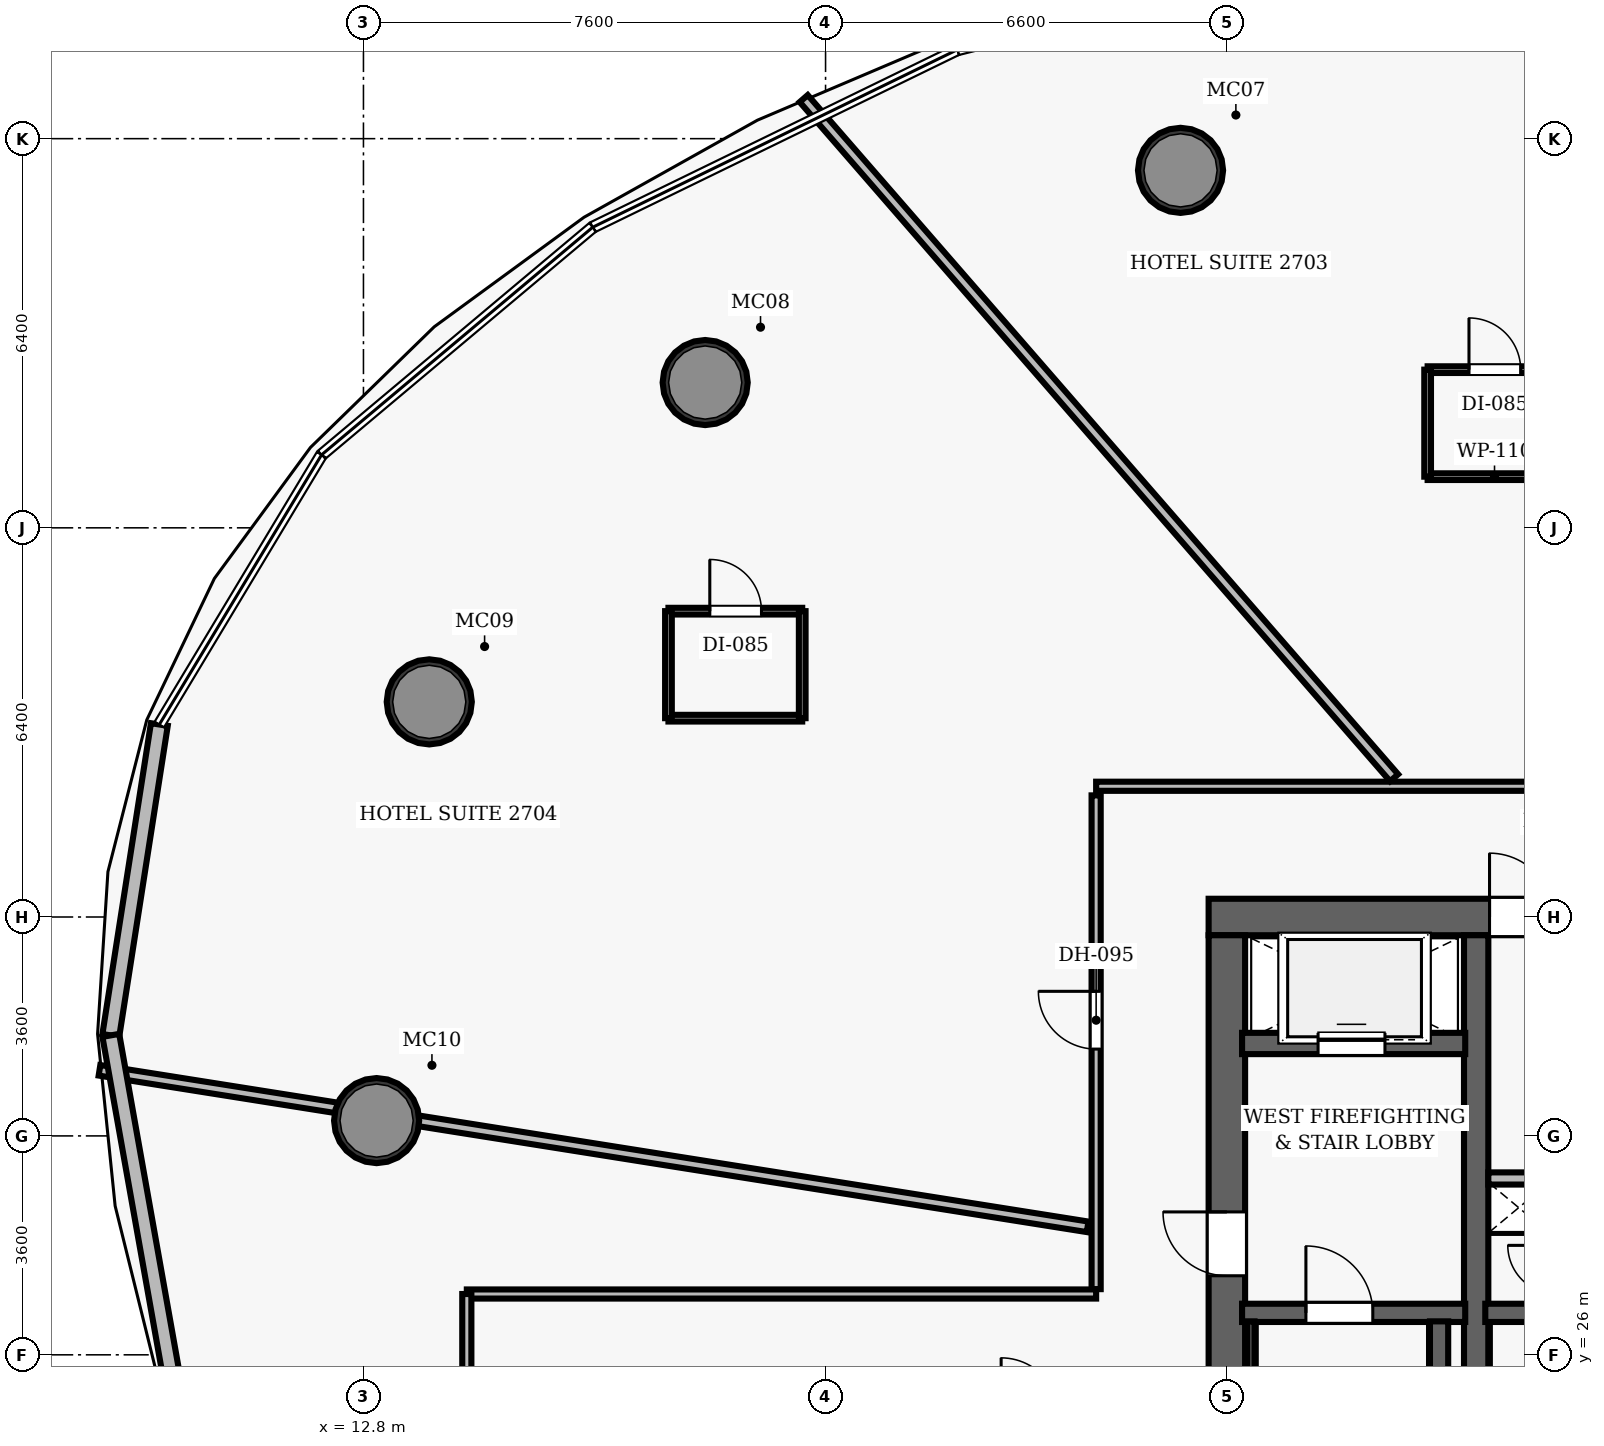
"""IFC4 building model, lengths in metres.
Left out: names, types, materials, properties, quantities, classifications, styles, units other than length and angle.
Written with IfcOpenShell. Run it as: python <this file> out.ifc"""

import sys

from ifc_helpers import new_model, si_unit, direction, frame, frame_2d, origin, origin_2d, place, context, subcontext, project, spatial, rectangle, hollow_circle, extrude, element, fill, save


model = new_model("IFC4")
c1 = context("Model", 3, precision=1e-05, world=origin(), true_north=direction((0.0, 1.0)))
c2 = subcontext(c1, "Body", "Model", "MODEL_VIEW")
j1 = project(units=[si_unit("LENGTHUNIT", "METRE"), si_unit("PLANEANGLEUNIT", "RADIAN")], contexts=[c1])
p1 = place(None, origin())
s1 = spatial("IfcSite", under=j1, at=p1, CompositionType="ELEMENT")
p2 = place(p1, origin())
s2 = spatial("IfcBuilding", under=s1, at=p2, CompositionType="ELEMENT")
p3 = place(p2, frame((0.0, 0.0, 113.3)))
s3 = spatial("IfcBuildingStorey", under=s2, at=p3, CompositionType="ELEMENT", Elevation=113.3)
p4 = place(p3, frame((26.7, 33.2, 0.0), z_axis=(0.0, 0.0, 1.0), x_axis=(1.0, 0.0, 0.0)))
e1 = element("IfcWall", 1, at=p4, inside=s3, PredefinedType="SHEAR", context=c2, shape_type="SweptSolid", body=[
    extrude(rectangle(XDim=22.6, YDim=0.6, at=frame_2d((11.3, 0.0))), origin(), (0.0, 0.0, 1.0), 3.5),
])
p5 = place(p4, frame((4.62, 0.0, 0.0)))
e2 = element("IfcOpeningElement", 2, at=p5, cuts=e1, PredefinedType="OPENING", context=c2, shape_type="SweptSolid", body=[
    extrude(rectangle(XDim=1.05, YDim=2.15, at=frame_2d((0.525, 1.075))), frame((0.0, 0.31, 0.0), z_axis=(0.0, -1.0, 0.0), x_axis=(1.0, 0.0, 0.0)), (0.0, 0.0, 1.0), 0.62),
])
p6 = place(p4, frame((14.52, 0.0, 0.0)))
e3 = element("IfcOpeningElement", 3, at=p6, cuts=e1, PredefinedType="OPENING", context=c2, shape_type="SweptSolid", body=[
    extrude(rectangle(XDim=1.05, YDim=2.15, at=frame_2d((0.525, 1.075))), frame((0.0, 0.31, 0.0), z_axis=(0.0, -1.0, 0.0), x_axis=(1.0, 0.0, 0.0)), (0.0, 0.0, 1.0), 0.62),
])
p7 = place(p3, frame((27.0, 19.1, 0.0), z_axis=(0.0, 0.0, 1.0), x_axis=(0.0, 1.0, 0.0)))
e4 = element("IfcWall", 4, at=p7, inside=s3, PredefinedType="SHEAR", context=c2, shape_type="SweptSolid", body=[
    extrude(rectangle(XDim=13.8, YDim=0.6, at=frame_2d((6.9, 0.0))), origin(), (0.0, 0.0, 1.0), 3.5),
])
p8 = place(p7, frame((8.2, 0.0, 0.0)))
e5 = element("IfcOpeningElement", 5, at=p8, cuts=e4, PredefinedType="OPENING", context=c2, shape_type="SweptSolid", body=[
    extrude(rectangle(XDim=1.05, YDim=2.15, at=frame_2d((0.525, 1.075))), frame((0.0, 0.31, 0.0), z_axis=(0.0, -1.0, 0.0), x_axis=(1.0, 0.0, 0.0)), (0.0, 0.0, 1.0), 0.62),
])
p9 = place(p3, frame((31.1, 19.1, 0.0), z_axis=(0.0, 0.0, 1.0), x_axis=(0.0, 1.0, 0.0)))
e6 = element("IfcWall", 6, at=p9, inside=s3, PredefinedType="SHEAR", context=c2, shape_type="SweptSolid", body=[
    extrude(rectangle(XDim=13.8, YDim=0.4, at=frame_2d((6.9, 0.0))), origin(), (0.0, 0.0, 1.0), 3.5),
])
for number, where, z_axis, x_axis in (
    (7, (26.238, 45.479, 0.0), (0.0, 0.0, 1.0), (1.0, 0.0, 0.0)),
    (8, (18.42, 41.989, 0.0), (0.0, 0.0, 1.0), (1.0, 0.0, 0.0)),
    (9, (13.882, 36.738, 0.0), (0.0, 0.0, 1.0), (1.0, 0.0, 0.0)),
    (10, (13.016, 29.852, 0.0), (0.0, 0.0, 1.0), (1.0, 0.0, 0.0)),
):
    element("IfcColumn", number, at=place(p3, frame(where, z_axis=z_axis, x_axis=x_axis)), inside=s3, PredefinedType="COLUMN", context=c2, shape_type="SweptSolid", body=[
        extrude(hollow_circle(Radius=0.7, WallThickness=0.055, at=origin_2d()), origin(), (0.0, 0.0, 1.0), 3.5),
    ])
p10 = place(p3, frame((27.25, 26.69, 0.0), z_axis=(0.0, 0.0, 1.0), x_axis=(1.0, 0.0, 0.0)))
e11 = element("IfcWall", 11, at=p10, inside=s3, PredefinedType="SHEAR", context=c2, shape_type="SweptSolid", body=[
    extrude(rectangle(XDim=3.67, YDim=0.3, at=frame_2d((1.835, 0.0))), origin(), (0.0, 0.0, 1.0), 3.5),
])
p11 = place(p10, frame((1.05, 0.0, 0.0)))
e12 = element("IfcOpeningElement", 12, at=p11, cuts=e11, PredefinedType="OPENING", context=c2, shape_type="SweptSolid", body=[
    extrude(rectangle(XDim=1.1, YDim=2.15, at=frame_2d((0.55, 1.075))), frame((0.0, 0.16, 0.0), z_axis=(0.0, -1.0, 0.0), x_axis=(1.0, 0.0, 0.0)), (0.0, 0.0, 1.0), 0.32),
])
p12 = place(p3, frame((30.49, 19.05, 0.0), z_axis=(0.0, 0.0, 1.0), x_axis=(0.0, 1.0, 0.0)))
e13 = element("IfcWall", 13, at=p12, inside=s3, PredefinedType="SHEAR", context=c2, shape_type="SweptSolid", body=[
    extrude(rectangle(XDim=7.5, YDim=0.3, at=frame_2d((3.75, 0.0))), origin(), (0.0, 0.0, 1.0), 3.5),
])
p13 = place(p3, frame((27.395, 19.1, 0.0), z_axis=(0.0, 0.0, 1.0), x_axis=(0.0, 1.0, 0.0)))
e14 = element("IfcWall", 14, at=p13, inside=s3, PredefinedType="SHEAR", context=c2, shape_type="SweptSolid", body=[
    extrude(rectangle(XDim=7.45, YDim=0.12, at=frame_2d((3.725, 0.0))), origin(), (0.0, 0.0, 1.0), 3.5),
])
p14 = place(p3, frame((27.25, 31.12, 0.0), z_axis=(0.0, 0.0, 1.0), x_axis=(1.0, 0.0, 0.0)))
e15 = element("IfcWall", 15, at=p14, inside=s3, PredefinedType="SHEAR", context=c2, shape_type="SweptSolid", body=[
    extrude(rectangle(XDim=3.67, YDim=0.35, at=frame_2d((1.835, 0.0))), origin(), (0.0, 0.0, 1.0), 2.675),
])
p15 = place(p14, frame((1.25, 0.0, 0.0)))
e16 = element("IfcOpeningElement", 16, at=p15, cuts=e15, PredefinedType="OPENING", context=c2, shape_type="SweptSolid", body=[
    extrude(rectangle(XDim=1.1, YDim=2.15, at=frame_2d((0.55, 1.075))), frame((0.0, 0.185, 0.0), z_axis=(0.0, -1.0, 0.0), x_axis=(1.0, 0.0, 0.0)), (0.0, 0.0, 1.0), 0.37),
])
p16 = place(p3, frame((31.25, 26.69, 0.0), z_axis=(0.0, 0.0, 1.0), x_axis=(1.0, 0.0, 0.0)))
e17 = element("IfcWall", 17, at=p16, inside=s3, PredefinedType="SHEAR", context=c2, shape_type="SweptSolid", body=[
    extrude(rectangle(XDim=3.56, YDim=0.3, at=frame_2d((1.78, 0.0))), origin(), (0.0, 0.0, 1.0), 3.5),
])
p17 = place(p16, frame((1.55, 0.0, 0.0)))
e18 = element("IfcOpeningElement", 18, at=p17, cuts=e17, PredefinedType="OPENING", context=c2, shape_type="SweptSolid", body=[
    extrude(rectangle(XDim=1.1, YDim=2.15, at=frame_2d((0.55, 1.075))), frame((0.0, 0.16, 0.0), z_axis=(0.0, -1.0, 0.0), x_axis=(1.0, 0.0, 0.0)), (0.0, 0.0, 1.0), 0.32),
])
p18 = place(p3, frame((31.3, 28.9, 0.0), z_axis=(0.0, 0.0, 1.0), x_axis=(1.0, 0.0, 0.0)))
e19 = element("IfcWall", 19, at=p18, inside=s3, PredefinedType="PARTITIONING", context=c2, shape_type="SweptSolid", body=[
    extrude(rectangle(XDim=1.12, YDim=0.2, at=frame_2d((0.56, 0.0))), origin(), (0.0, 0.0, 1.0), 2.675),
])
p19 = place(p3, frame((24.85, 35.35, 0.0), z_axis=(0.0, 0.0, 1.0), x_axis=(1.0, 0.0, 0.0)))
e20 = element("IfcWall", 20, at=p19, inside=s3, PredefinedType="PARTITIONING", context=c2, shape_type="SweptSolid", body=[
    extrude(rectangle(XDim=26.0, YDim=0.15, at=frame_2d((13.0, 0.0))), origin(), (0.0, 0.0, 1.0), 2.675),
])
p20 = place(p19, frame((14.325, 0.0, 0.0)))
e21 = element("IfcOpeningElement", 21, at=p20, cuts=e20, PredefinedType="OPENING", context=c2, shape_type="SweptSolid", body=[
    extrude(rectangle(XDim=0.95, YDim=2.15, at=frame_2d((0.475, 1.075))), frame((0.0, 0.085, 0.0), z_axis=(0.0, -1.0, 0.0), x_axis=(1.0, 0.0, 0.0)), (0.0, 0.0, 1.0), 0.17),
])
p21 = place(p19, frame((7.162, 0.0, 0.0)))
e22 = element("IfcOpeningElement", 22, at=p21, cuts=e20, PredefinedType="OPENING", context=c2, shape_type="SweptSolid", body=[
    extrude(rectangle(XDim=0.95, YDim=2.15, at=frame_2d((0.475, 1.075))), frame((0.0, 0.085, 0.0), z_axis=(0.0, -1.0, 0.0), x_axis=(1.0, 0.0, 0.0)), (0.0, 0.0, 1.0), 0.17),
])
p22 = place(p3, frame((24.85, 27.08, 0.0), z_axis=(0.0, 0.0, 1.0), x_axis=(0.0, 1.0, 0.0)))
e23 = element("IfcWall", 23, at=p22, inside=s3, PredefinedType="PARTITIONING", context=c2, shape_type="SweptSolid", body=[
    extrude(rectangle(XDim=8.12, YDim=0.15, at=frame_2d((4.06, 0.0))), origin(), (0.0, 0.0, 1.0), 2.675),
])
p23 = place(p22, frame((3.948, 0.0, 0.0)))
e24 = element("IfcOpeningElement", 24, at=p23, cuts=e23, PredefinedType="OPENING", context=c2, shape_type="SweptSolid", body=[
    extrude(rectangle(XDim=0.95, YDim=2.15, at=frame_2d((0.475, 1.075))), frame((0.0, 0.085, 0.0), z_axis=(0.0, -1.0, 0.0), x_axis=(1.0, 0.0, 0.0)), (0.0, 0.0, 1.0), 0.17),
])
p24 = place(p3, frame((14.5, 27.0, 0.0), z_axis=(0.0, 0.0, 1.0), x_axis=(1.0, 0.0, 0.0)))
e25 = element("IfcWall", 25, at=p24, inside=s3, PredefinedType="PARTITIONING", context=c2, shape_type="SweptSolid", body=[
    extrude(rectangle(XDim=10.35, YDim=0.15, at=frame_2d((5.175, 0.0))), origin(), (0.0, 0.0, 1.0), 2.675),
])
p25 = place(p3, frame((14.5, 25.0, 0.0), z_axis=(0.0, 0.0, 1.0), x_axis=(0.0, 1.0, 0.0)))
e26 = element("IfcWall", 26, at=p25, inside=s3, PredefinedType="PARTITIONING", context=c2, shape_type="SweptSolid", body=[
    extrude(rectangle(XDim=2.0, YDim=0.15, at=frame_2d((1.0, 0.0))), origin(), (0.0, 0.0, 1.0), 2.675),
])
p26 = place(p3, frame((29.75, 35.49, 0.0), z_axis=(0.0, 0.0, 1.0), x_axis=(-0.656052099028, 0.754715604291, 0.0)))
e27 = element("IfcWall", 27, at=p26, inside=s3, PredefinedType="PARTITIONING", context=c2, shape_type="SweptSolid", body=[
    extrude(rectangle(XDim=14.8, YDim=0.175, at=frame_2d((7.4, 0.0))), origin(), (0.0, 0.0, 1.0), 2.675),
])
p27 = place(p3, frame((24.71, 28.105, 0.0), z_axis=(0.0, 0.0, 1.0), x_axis=(-0.98768802025, 0.156436487606, 0.0)))
e28 = element("IfcWall", 28, at=p27, inside=s3, PredefinedType="PARTITIONING", context=c2, shape_type="SweptSolid", body=[
    extrude(rectangle(XDim=16.454, YDim=0.175, at=frame_2d((8.227, 0.0))), origin(), (0.0, 0.0, 1.0), 2.675),
])
p28 = place(p3, frame((30.302, 40.441, 0.0), z_axis=(0.0, 0.0, 1.0), x_axis=(1.0, 0.0, 0.0)))
e29 = element("IfcWall", 29, at=p28, inside=s3, PredefinedType="PARTITIONING", context=c2, shape_type="SweptSolid", body=[
    extrude(rectangle(XDim=2.2, YDim=0.11, at=frame_2d((1.1, 0.0))), origin(), (0.0, 0.0, 1.0), 2.675),
])
p29 = place(p3, frame((30.302, 42.201, 0.0), z_axis=(0.0, 0.0, 1.0), x_axis=(1.0, 0.0, 0.0)))
e30 = element("IfcWall", 30, at=p29, inside=s3, PredefinedType="PARTITIONING", context=c2, shape_type="SweptSolid", body=[
    extrude(rectangle(XDim=2.2, YDim=0.11, at=frame_2d((1.1, 0.0))), origin(), (0.0, 0.0, 1.0), 2.675),
])
p30 = place(p29, frame((0.68, 0.0, 0.0)))
e31 = element("IfcOpeningElement", 31, at=p30, cuts=e30, PredefinedType="OPENING", context=c2, shape_type="SweptSolid", body=[
    extrude(rectangle(XDim=0.85, YDim=2.1, at=frame_2d((0.425, 1.05))), frame((0.0, 0.065, 0.0), z_axis=(0.0, -1.0, 0.0), x_axis=(1.0, 0.0, 0.0)), (0.0, 0.0, 1.0), 0.13),
])
p31 = place(p3, frame((30.302, 40.441, 0.0), z_axis=(0.0, 0.0, 1.0), x_axis=(0.0, 1.0, 0.0)))
e32 = element("IfcWall", 32, at=p31, inside=s3, PredefinedType="PARTITIONING", context=c2, shape_type="SweptSolid", body=[
    extrude(rectangle(XDim=1.76, YDim=0.11, at=frame_2d((0.88, 0.0))), origin(), (0.0, 0.0, 1.0), 2.675),
])
p32 = place(p3, frame((17.816, 36.469, 0.0), z_axis=(0.0, 0.0, 1.0), x_axis=(1.0, 0.0, 0.0)))
e33 = element("IfcWall", 33, at=p32, inside=s3, PredefinedType="PARTITIONING", context=c2, shape_type="SweptSolid", body=[
    extrude(rectangle(XDim=2.2, YDim=0.11, at=frame_2d((1.1, 0.0))), origin(), (0.0, 0.0, 1.0), 2.675),
])
p33 = place(p3, frame((17.816, 38.229, 0.0), z_axis=(0.0, 0.0, 1.0), x_axis=(1.0, 0.0, 0.0)))
e34 = element("IfcWall", 34, at=p33, inside=s3, PredefinedType="PARTITIONING", context=c2, shape_type="SweptSolid", body=[
    extrude(rectangle(XDim=2.2, YDim=0.11, at=frame_2d((1.1, 0.0))), origin(), (0.0, 0.0, 1.0), 2.675),
])
p34 = place(p33, frame((0.68, 0.0, 0.0)))
e35 = element("IfcOpeningElement", 35, at=p34, cuts=e34, PredefinedType="OPENING", context=c2, shape_type="SweptSolid", body=[
    extrude(rectangle(XDim=0.85, YDim=2.1, at=frame_2d((0.425, 1.05))), frame((0.0, 0.065, 0.0), z_axis=(0.0, -1.0, 0.0), x_axis=(1.0, 0.0, 0.0)), (0.0, 0.0, 1.0), 0.13),
])
for number, where, z_axis, x_axis in (
    (36, (17.816, 36.469, 0.0), (0.0, 0.0, 1.0), (0.0, 1.0, 0.0)),
    (37, (20.016, 36.469, 0.0), (0.0, 0.0, 1.0), (0.0, 1.0, 0.0)),
):
    element("IfcWall", number, at=place(p3, frame(where, z_axis=z_axis, x_axis=x_axis)), inside=s3, PredefinedType="PARTITIONING", context=c2, shape_type="SweptSolid", body=[
        extrude(rectangle(XDim=1.76, YDim=0.11, at=frame_2d((0.88, 0.0))), origin(), (0.0, 0.0, 1.0), 2.675),
    ])
p35 = place(p3, frame((8.645, 31.253, 0.0), z_axis=(0.0, 0.0, 1.0), x_axis=(0.154237267415, 0.988033838156, 0.0)))
e38 = element("IfcWall", 38, at=p35, inside=s3, PredefinedType="SOLIDWALL", context=c2, shape_type="SweptSolid", body=[
    extrude(rectangle(XDim=5.175, YDim=0.28, at=frame_2d((2.587, 0.0))), origin(), (0.0, 0.0, 1.0), 3.26),
])
p36 = place(p3, frame((9.666, 25.521, 0.0), z_axis=(0.0, 0.0, 1.0), x_axis=(-0.175260935911, 0.984522018212, 0.0)))
e39 = element("IfcWall", 39, at=p36, inside=s3, PredefinedType="SOLIDWALL", context=c2, shape_type="SweptSolid", body=[
    extrude(rectangle(XDim=5.823, YDim=0.28, at=frame_2d((2.911, 0.0))), origin(), (0.0, 0.0, 1.0), 3.26),
])
p37 = place(p11, origin())
e40 = element("IfcDoor", 40, at=p37, inside=s3, OperationType="SINGLE_SWING_LEFT", PredefinedType="DOOR", context=c2, shape_type="SweptSolid", body=[
    extrude(rectangle(XDim=1.1, YDim=2.15, at=frame_2d((0.55, 1.075))), frame((0.0, 0.025, 0.0), z_axis=(0.0, -1.0, 0.0), x_axis=(1.0, 0.0, 0.0)), (0.0, 0.0, 1.0), 0.05),
])
fill(e12, e40)
p38 = place(p8, origin())
e41 = element("IfcDoor", 41, at=p38, inside=s3, OperationType="SINGLE_SWING_RIGHT", PredefinedType="DOOR", context=c2, shape_type="SweptSolid", body=[
    extrude(rectangle(XDim=1.05, YDim=2.15, at=frame_2d((0.525, 1.075))), frame((0.0, 0.025, 0.0), z_axis=(0.0, -1.0, 0.0), x_axis=(1.0, 0.0, 0.0)), (0.0, 0.0, 1.0), 0.05),
])
fill(e5, e41)
p39 = place(p5, origin())
e42 = element("IfcDoor", 42, at=p39, inside=s3, OperationType="SINGLE_SWING_LEFT", PredefinedType="DOOR", context=c2, shape_type="SweptSolid", body=[
    extrude(rectangle(XDim=1.05, YDim=2.15, at=frame_2d((0.525, 1.075))), frame((0.0, 0.025, 0.0), z_axis=(0.0, -1.0, 0.0), x_axis=(1.0, 0.0, 0.0)), (0.0, 0.0, 1.0), 0.05),
])
fill(e2, e42)
p40 = place(p30, origin())
e43 = element("IfcDoor", 43, at=p40, inside=s3, OperationType="SINGLE_SWING_LEFT", PredefinedType="DOOR", context=c2, shape_type="SweptSolid", body=[
    extrude(rectangle(XDim=0.85, YDim=2.1, at=frame_2d((0.425, 1.05))), frame((0.0, 0.025, 0.0), z_axis=(0.0, -1.0, 0.0), x_axis=(1.0, 0.0, 0.0)), (0.0, 0.0, 1.0), 0.05),
])
fill(e31, e43)
p41 = place(p23, origin())
e44 = element("IfcDoor", 44, at=p41, inside=s3, OperationType="SINGLE_SWING_RIGHT", PredefinedType="DOOR", context=c2, shape_type="SweptSolid", body=[
    extrude(rectangle(XDim=0.95, YDim=2.15, at=frame_2d((0.475, 1.075))), frame((0.0, 0.025, 0.0), z_axis=(0.0, -1.0, 0.0), x_axis=(1.0, 0.0, 0.0)), (0.0, 0.0, 1.0), 0.05),
])
fill(e24, e44)
p42 = place(p34, origin())
e45 = element("IfcDoor", 45, at=p42, inside=s3, OperationType="SINGLE_SWING_LEFT", PredefinedType="DOOR", context=c2, shape_type="SweptSolid", body=[
    extrude(rectangle(XDim=0.85, YDim=2.1, at=frame_2d((0.425, 1.05))), frame((0.0, 0.025, 0.0), z_axis=(0.0, -1.0, 0.0), x_axis=(1.0, 0.0, 0.0)), (0.0, 0.0, 1.0), 0.05),
])
fill(e35, e45)
p43 = place(p15, origin())
e46 = element("IfcDoor", 46, at=p43, inside=s3, OperationType="SLIDING_TO_LEFT", PredefinedType="DOOR", context=c2, shape_type="SweptSolid", body=[
    extrude(rectangle(XDim=1.1, YDim=2.15, at=frame_2d((0.55, 1.075))), frame((0.0, 0.025, 0.0), z_axis=(0.0, -1.0, 0.0), x_axis=(1.0, 0.0, 0.0)), (0.0, 0.0, 1.0), 0.05),
])
fill(e16, e46)
save(model, sys.argv[1])
